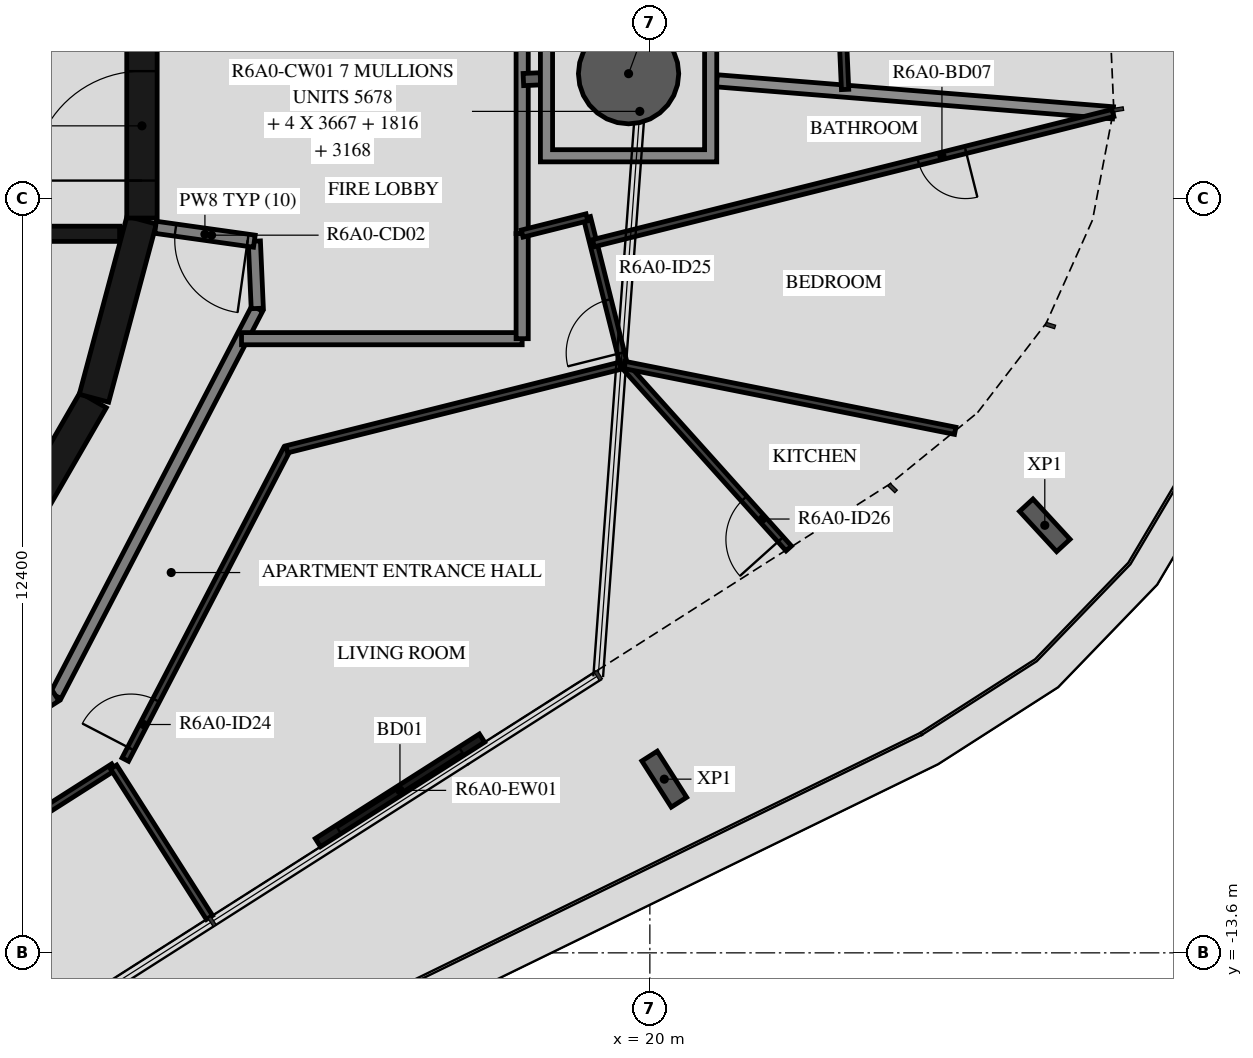
"""IFC4 building model, lengths in metres.
Left out: names, types, materials, properties, quantities, classifications, styles, units other than length and angle.
Written with IfcOpenShell. Run it as: python <this file> out.ifc"""

import sys

from ifc_helpers import new_model, si_unit, direction, frame, frame_2d, origin, origin_2d, place, context, subcontext, project, spatial, polyline, rectangle, hollow_circle, i_section, outline, extrude, element, fill, save


model = new_model("IFC4")
c1 = context("Model", 3, precision=1e-05, world=origin(), true_north=direction((0.0, 1.0)))
c2 = subcontext(c1, "Body", "Model", "MODEL_VIEW")
j1 = project(units=[si_unit("LENGTHUNIT", "METRE"), si_unit("PLANEANGLEUNIT", "RADIAN")], contexts=[c1])
p1 = place(None, origin())
s1 = spatial("IfcSite", under=j1, at=p1, CompositionType="ELEMENT")
p2 = place(p1, origin())
s2 = spatial("IfcBuilding", under=s1, at=p2, CompositionType="ELEMENT")
p3 = place(p2, frame((0.0, 0.0, 226.7)))
s3 = spatial("IfcBuildingStorey", under=s2, at=p3, CompositionType="ELEMENT", Elevation=226.7)
p4 = place(p3, frame((19.65, 0.858, -0.45), z_axis=(0.0, 0.0, 1.0), x_axis=(1.0, 0.0, 0.0)))
e1 = element("IfcColumn", 1, at=p4, inside=s3, PredefinedType="COLUMN", context=c2, shape_type="SweptSolid", body=[
    extrude(hollow_circle(Radius=0.825, WallThickness=0.04, at=origin_2d()), origin(), (0.0, 0.0, 1.0), 3.57),
])
for number, where, z_axis, x_axis in (
    (2, (20.237, -10.744, -0.45), (0.0, 0.0, 1.0), (-0.843, -0.537, 0.0)),
    (3, (26.495, -6.569, -0.45), (0.0, 0.0, 1.0), (-0.735, -0.678, 0.0)),
):
    element("IfcColumn", number, at=place(p3, frame(where, z_axis=z_axis, x_axis=x_axis)), inside=s3, PredefinedType="COLUMN", context=c2, shape_type="SweptSolid", body=[
        extrude(i_section(OverallWidth=0.3, OverallDepth=0.9, WebThickness=0.019, FlangeThickness=0.035, FilletRadius=0.03, at=origin_2d()), origin(), (0.0, 0.0, 1.0), 3.57),
    ])
p5 = place(p3, frame((14.541, -11.788, 0.0), z_axis=(0.0, 0.0, 1.0), x_axis=(0.843419508298, 0.53725555653, 0.0)))
e4 = element("IfcWall", 4, at=p5, inside=s3, PredefinedType="STANDARD", context=c2, shape_type="SweptSolid", body=[
    extrude(rectangle(XDim=3.2, YDim=0.16, at=frame_2d((1.6, 0.0))), origin(), (0.0, 0.0, 1.0), 3.12),
])
p6 = place(p5, frame((0.4, 0.0, 0.0)))
e5 = element("IfcOpeningElement", 5, at=p6, cuts=e4, PredefinedType="OPENING", context=c2, shape_type="SweptSolid", body=[
    extrude(rectangle(XDim=2.4, YDim=2.4, at=frame_2d((1.2, 1.2))), frame((0.0, 0.09, 0.0), z_axis=(0.0, -1.0, 0.0), x_axis=(1.0, 0.0, 0.0)), (0.0, 0.0, 1.0), 0.18),
])
for number, where, z_axis, x_axis in (
    (6, (9.329, -7.137, 0.0), (0.0, 0.0, 1.0), (0.5, 0.866, 0.0)),
    (7, (10.858, -4.479, 0.0), (0.0, 0.0, 1.0), (0.259, 0.966, 0.0)),
):
    element("IfcWall", number, at=place(p3, frame(where, z_axis=z_axis, x_axis=x_axis)), inside=s3, PredefinedType="SHEAR", context=c2, shape_type="SweptSolid", body=[
        extrude(rectangle(XDim=3.033, YDim=0.5, at=frame_2d((1.516, 0.0))), origin(), (0.0, 0.0, 1.0), 3.12),
    ])
p7 = place(p3, frame((11.647, -1.516, 0.0), z_axis=(0.0, 0.0, 1.0), x_axis=(0.0, 1.0, 0.0)))
e8 = element("IfcWall", 8, at=p7, inside=s3, PredefinedType="SHEAR", context=c2, shape_type="SweptSolid", body=[
    extrude(rectangle(XDim=3.033, YDim=0.5, at=frame_2d((1.516, 0.0))), origin(), (0.0, 0.0, 1.0), 3.12),
])
p8 = place(p7, frame((0.616, 0.0, 0.0)))
e9 = element("IfcOpeningElement", 9, at=p8, cuts=e8, PredefinedType="OPENING", context=c2, shape_type="SweptSolid", body=[
    extrude(rectangle(XDim=1.8, YDim=2.1, at=frame_2d((0.9, 1.05))), frame((0.0, 0.26, 0.0), z_axis=(0.0, -1.0, 0.0), x_axis=(1.0, 0.0, 0.0)), (0.0, 0.0, 1.0), 0.52),
])
p9 = place(p3, frame((3.35, -1.775, 0.0), z_axis=(0.0, 0.0, 1.0), x_axis=(1.0, 0.0, 0.0)))
e10 = element("IfcWall", 10, at=p9, inside=s3, PredefinedType="SHEAR", context=c2, shape_type="SweptSolid", body=[
    extrude(rectangle(XDim=7.93, YDim=0.25, at=frame_2d((3.965, 0.0))), origin(), (0.0, 0.0, 1.0), 3.12),
])
p10 = place(p9, frame((0.4, 0.0, 0.0)))
e11 = element("IfcOpeningElement", 11, at=p10, cuts=e10, PredefinedType="OPENING", context=c2, shape_type="SweptSolid", body=[
    extrude(rectangle(XDim=1.1, YDim=2.4, at=frame_2d((0.55, 1.2))), frame((0.0, 0.135, 0.0), z_axis=(0.0, -1.0, 0.0), x_axis=(1.0, 0.0, 0.0)), (0.0, 0.0, 1.0), 0.27),
])
p11 = place(p9, frame((2.55, 0.0, 0.0)))
e12 = element("IfcOpeningElement", 12, at=p11, cuts=e10, PredefinedType="OPENING", context=c2, shape_type="SweptSolid", body=[
    extrude(rectangle(XDim=1.1, YDim=2.4, at=frame_2d((0.55, 1.2))), frame((0.0, 0.135, 0.0), z_axis=(0.0, -1.0, 0.0), x_axis=(1.0, 0.0, 0.0)), (0.0, 0.0, 1.0), 0.27),
])
p12 = place(p9, frame((4.7, 0.0, 0.0)))
e13 = element("IfcOpeningElement", 13, at=p12, cuts=e10, PredefinedType="OPENING", context=c2, shape_type="SweptSolid", body=[
    extrude(rectangle(XDim=1.1, YDim=2.4, at=frame_2d((0.55, 1.2))), frame((0.0, 0.135, 0.0), z_axis=(0.0, -1.0, 0.0), x_axis=(1.0, 0.0, 0.0)), (0.0, 0.0, 1.0), 0.27),
])
p13 = place(p3, frame((10.228, -9.372, 0.0), z_axis=(0.0, 0.0, 1.0), x_axis=(0.461759464021, 0.887005184532, 0.0)))
e14 = element("IfcWall", 14, at=p13, inside=s3, PredefinedType="STANDARD", context=c2, shape_type="SweptSolid", body=[
    extrude(rectangle(XDim=7.181, YDim=0.2, at=frame_2d((3.591, 0.0))), origin(), (0.0, 0.0, 1.0), 3.12),
])
p14 = place(p3, frame((13.544, -3.003, 0.0), z_axis=(0.0, 0.0, 1.0), x_axis=(-0.043666917606, 0.999046145234, 0.0)))
e15 = element("IfcWall", 15, at=p14, inside=s3, PredefinedType="STANDARD", context=c2, shape_type="SweptSolid", body=[
    extrude(rectangle(XDim=1.107, YDim=0.2, at=frame_2d((0.553, 0.0))), origin(), (0.0, 0.0, 1.0), 3.12),
])
p15 = place(p3, frame((13.496, -1.897, 0.0), z_axis=(0.0, 0.0, 1.0), x_axis=(-0.99026234641, 0.139213811391, 0.0)))
e16 = element("IfcWall", 16, at=p15, inside=s3, PredefinedType="STANDARD", context=c2, shape_type="SweptSolid", body=[
    extrude(rectangle(XDim=1.641, YDim=0.2, at=frame_2d((0.821, 0.0))), origin(), (0.0, 0.0, 1.0), 3.12),
])
p16 = place(p15, frame((0.11, 0.0, 0.0)))
e17 = element("IfcOpeningElement", 17, at=p16, cuts=e16, PredefinedType="OPENING", context=c2, shape_type="SweptSolid", body=[
    extrude(rectangle(XDim=1.2, YDim=2.1, at=frame_2d((0.6, 1.05))), frame((0.0, 0.11, 0.0), z_axis=(0.0, -1.0, 0.0), x_axis=(1.0, 0.0, 0.0)), (0.0, 0.0, 1.0), 0.22),
])
p17 = place(p3, frame((4.172, -13.231, 0.0), z_axis=(0.0, 0.0, 1.0), x_axis=(0.843388394728, 0.537304397561, 0.0)))
e18 = element("IfcWall", 18, at=p17, inside=s3, PredefinedType="STANDARD", context=c2, shape_type="SweptSolid", body=[
    extrude(rectangle(XDim=7.181, YDim=0.2, at=frame_2d((3.59, 0.0))), origin(), (0.0, 0.0, 1.0), 3.12),
])
p18 = place(p17, frame((0.2, 0.0, 0.0)))
e19 = element("IfcOpeningElement", 19, at=p18, cuts=e18, PredefinedType="OPENING", context=c2, shape_type="SweptSolid", body=[
    extrude(rectangle(XDim=1.0, YDim=2.1, at=frame_2d((0.5, 1.05))), frame((0.0, 0.11, 0.0), z_axis=(0.0, -1.0, 0.0), x_axis=(1.0, 0.0, 0.0)), (0.0, 0.0, 1.0), 0.22),
])
p19 = place(p3, frame((17.9, -1.772, 0.0), z_axis=(0.0, 0.0, 1.0), x_axis=(0.0, 1.0, 0.0)))
e20 = element("IfcWall", 20, at=p19, inside=s3, PredefinedType="STANDARD", context=c2, shape_type="SweptSolid", body=[
    extrude(rectangle(XDim=5.272, YDim=0.2, at=frame_2d((2.636, 0.0))), origin(), (0.0, 0.0, 1.0), 3.12),
])
p20 = place(p3, frame((13.285, -3.5, 0.0), z_axis=(0.0, 0.0, 1.0), x_axis=(1.0, 0.0, 0.0)))
e21 = element("IfcWall", 21, at=p20, inside=s3, PredefinedType="STANDARD", context=c2, shape_type="SweptSolid", body=[
    extrude(rectangle(XDim=4.615, YDim=0.2, at=frame_2d((2.308, 0.0))), origin(), (0.0, 0.0, 1.0), 3.12),
])
p21 = place(p3, frame((17.9, -3.5, 0.0), z_axis=(0.0, 0.0, 1.0), x_axis=(0.0, 1.0, 0.0)))
e22 = element("IfcWall", 22, at=p21, inside=s3, PredefinedType="STANDARD", context=c2, shape_type="SweptSolid", body=[
    extrude(rectangle(XDim=1.728, YDim=0.2, at=frame_2d((0.864, 0.0))), origin(), (0.0, 0.0, 1.0), 3.12),
])
p22 = place(p3, frame((17.92, 0.761, 0.0), z_axis=(0.0, 0.0, 1.0), x_axis=(0.999051221661, 0.04355061995, 0.0)))
e23 = element("IfcWall", 23, at=p22, inside=s3, PredefinedType="STANDARD", context=c2, shape_type="SweptSolid", body=[
    extrude(rectangle(XDim=0.28, YDim=0.2, at=frame_2d((0.14, 0.0))), origin(), (0.0, 0.0, 1.0), 3.12),
])
p23 = place(p3, frame((21.1, 0.741, 0.0), z_axis=(0.0, 0.0, 1.0), x_axis=(0.996750718609, -0.080548153006, 0.0)))
e24 = element("IfcWall", 24, at=p23, inside=s3, PredefinedType="STANDARD", context=c2, shape_type="SweptSolid", body=[
    extrude(rectangle(XDim=6.538, YDim=0.2, at=frame_2d((3.269, 0.0))), origin(), (0.0, 0.0, 1.0), 2.73),
])
p24 = place(p3, frame((23.174, 1.427, 0.0), z_axis=(0.0, 0.0, 1.0), x_axis=(0.043884567994, -0.999036608284, 0.0)))
e25 = element("IfcWall", 25, at=p24, inside=s3, PredefinedType="PARTITIONING", context=c2, shape_type="SweptSolid", body=[
    extrude(rectangle(XDim=0.829, YDim=0.12, at=frame_2d((0.415, 0.0))), origin(), (0.0, 0.0, 1.0), 3.12),
])
p25 = place(p3, frame((4.83, -14.59, 0.0), z_axis=(0.0, 0.0, 1.0), x_axis=(0.843393042763, 0.537297101629, 0.0)))
e26 = element("IfcWall", 26, at=p25, inside=s3, PredefinedType="PARTITIONING", context=c2, shape_type="SweptSolid", body=[
    extrude(rectangle(XDim=7.53, YDim=0.12, at=frame_2d((3.765, 0.0))), origin(), (0.0, 0.0, 1.0), 3.12),
])
p26 = place(p25, frame((0.2, 0.0, 0.0)))
e27 = element("IfcOpeningElement", 27, at=p26, cuts=e26, PredefinedType="OPENING", context=c2, shape_type="SweptSolid", body=[
    extrude(rectangle(XDim=0.9, YDim=2.1, at=frame_2d((0.45, 1.05))), frame((0.0, 0.07, 0.0), z_axis=(0.0, -1.0, 0.0), x_axis=(1.0, 0.0, 0.0)), (0.0, 0.0, 1.0), 0.14),
])
p27 = place(p3, frame((11.373, -10.421, 0.0), z_axis=(0.0, 0.0, 1.0), x_axis=(0.461738939635, 0.887015868869, 0.0)))
e28 = element("IfcWall", 28, at=p27, inside=s3, PredefinedType="PARTITIONING", context=c2, shape_type="SweptSolid", body=[
    extrude(rectangle(XDim=5.752, YDim=0.12, at=frame_2d((2.876, 0.0))), origin(), (0.0, 0.0, 1.0), 3.12),
])
p28 = place(p27, frame((0.2, 0.0, 0.0)))
e29 = element("IfcOpeningElement", 29, at=p28, cuts=e28, PredefinedType="OPENING", context=c2, shape_type="SweptSolid", body=[
    extrude(rectangle(XDim=0.9, YDim=2.1, at=frame_2d((0.45, 1.05))), frame((0.0, 0.07, 0.0), z_axis=(0.0, -1.0, 0.0), x_axis=(1.0, 0.0, 0.0)), (0.0, 0.0, 1.0), 0.14),
])
p29 = place(p3, frame((14.029, -5.32, 0.0), z_axis=(0.0, 0.0, 1.0), x_axis=(0.969999099814, 0.243108507378, 0.0)))
e30 = element("IfcWall", 30, at=p29, inside=s3, PredefinedType="PARTITIONING", context=c2, shape_type="SweptSolid", body=[
    extrude(rectangle(XDim=5.715, YDim=0.12, at=frame_2d((2.857, 0.0))), origin(), (0.0, 0.0, 1.0), 3.12),
])
p30 = place(p3, frame((19.573, -3.93, 0.0), z_axis=(0.0, 0.0, 1.0), x_axis=(-0.243155959183, 0.96998720585, 0.0)))
e31 = element("IfcWall", 31, at=p30, inside=s3, PredefinedType="PARTITIONING", context=c2, shape_type="SweptSolid", body=[
    extrude(rectangle(XDim=2.5, YDim=0.12, at=frame_2d((1.25, 0.0))), origin(), (0.0, 0.0, 1.0), 3.12),
])
p31 = place(p30, frame((0.2, 0.0, 0.0)))
e32 = element("IfcOpeningElement", 32, at=p31, cuts=e31, PredefinedType="OPENING", context=c2, shape_type="SweptSolid", body=[
    extrude(rectangle(XDim=0.9, YDim=2.1, at=frame_2d((0.45, 1.05))), frame((0.0, 0.07, 0.0), z_axis=(0.0, -1.0, 0.0), x_axis=(1.0, 0.0, 0.0)), (0.0, 0.0, 1.0), 0.14),
])
p32 = place(p3, frame((18.965, -1.505, 0.0), z_axis=(0.0, 0.0, 1.0), x_axis=(-0.969998406835, -0.243111272339, 0.0)))
e33 = element("IfcWall", 33, at=p32, inside=s3, PredefinedType="PARTITIONING", context=c2, shape_type="SweptSolid", body=[
    extrude(rectangle(XDim=1.098, YDim=0.12, at=frame_2d((0.549, 0.0))), origin(), (0.0, 0.0, 1.0), 3.12),
])
p33 = place(p3, frame((12.758, -13.018, 0.0), z_axis=(0.0, 0.0, 1.0), x_axis=(-0.537338423153, 0.843366716798, 0.0)))
e34 = element("IfcWall", 34, at=p33, inside=s3, PredefinedType="PARTITIONING", context=c2, shape_type="SweptSolid", body=[
    extrude(rectangle(XDim=2.934, YDim=0.12, at=frame_2d((1.467, 0.0))), origin(), (0.0, 0.0, 1.0), 2.73),
])
p34 = place(p3, frame((22.284, -6.949, 0.0), z_axis=(0.0, 0.0, 1.0), x_axis=(-0.668156639948, 0.744020634454, 0.0)))
e35 = element("IfcWall", 35, at=p34, inside=s3, PredefinedType="PARTITIONING", context=c2, shape_type="SweptSolid", body=[
    extrude(rectangle(XDim=4.058, YDim=0.12, at=frame_2d((2.029, 0.0))), origin(), (0.0, 0.0, 1.0), 3.12),
])
p35 = place(p34, frame((0.2, 0.0, 0.0)))
e36 = element("IfcOpeningElement", 36, at=p35, cuts=e35, PredefinedType="OPENING", context=c2, shape_type="SweptSolid", body=[
    extrude(rectangle(XDim=0.9, YDim=2.1, at=frame_2d((0.45, 1.05))), frame((0.0, 0.07, 0.0), z_axis=(0.0, -1.0, 0.0), x_axis=(1.0, 0.0, 0.0)), (0.0, 0.0, 1.0), 0.14),
])
p36 = place(p3, frame((25.021, -5.015, 0.0), z_axis=(0.0, 0.0, 1.0), x_axis=(-0.98075605246, 0.195237203328, 0.0)))
e37 = element("IfcWall", 37, at=p36, inside=s3, PredefinedType="PARTITIONING", context=c2, shape_type="SweptSolid", body=[
    extrude(rectangle(XDim=5.556, YDim=0.12, at=frame_2d((2.778, 0.0))), origin(), (0.0, 0.0, 1.0), 3.12),
])
p37 = place(p3, frame((27.616, 0.212, 0.0), z_axis=(0.0, 0.0, 1.0), x_axis=(-0.969995609005, -0.243122435227, 0.0)))
e38 = element("IfcWall", 38, at=p37, inside=s3, PredefinedType="PARTITIONING", context=c2, shape_type="SweptSolid", body=[
    extrude(rectangle(XDim=8.81, YDim=0.12, at=frame_2d((4.405, 0.0))), origin(), (0.0, 0.0, 1.0), 3.12),
])
p38 = place(p37, frame((2.5, 0.0, 0.0)))
e39 = element("IfcOpeningElement", 39, at=p38, cuts=e38, PredefinedType="OPENING", context=c2, shape_type="SweptSolid", body=[
    extrude(rectangle(XDim=0.8, YDim=2.1, at=frame_2d((0.4, 1.05))), frame((0.0, 0.07, 0.0), z_axis=(0.0, -1.0, 0.0), x_axis=(1.0, 0.0, 0.0)), (0.0, 0.0, 1.0), 0.14),
])
p39 = place(p3, origin())
e40 = element("IfcWall", 40, at=p39, inside=s3, PredefinedType="STANDARD", context=c2, shape_type="SweptSolid", body=[
    extrude(outline(polyline([(21.1, 2.308), (21.1, -0.592), (18.2, -0.592), (18.2, 2.308), (21.1, 2.308)]), holes=[polyline([(18.4, -0.392), (20.9, -0.392), (20.9, 2.108), (18.4, 2.108), (18.4, -0.392)])]), origin(), (0.0, 0.0, 1.0), 3.12),
])
p40 = place(p6, origin())
e41 = element("IfcDoor", 41, at=p40, inside=s3, OperationType="DOUBLE_DOOR_SLIDING", PredefinedType="DOOR", context=c2, shape_type="SweptSolid", body=[
    extrude(rectangle(XDim=2.4, YDim=2.4, at=frame_2d((1.2, 1.2))), frame((0.0, 0.025, 0.0), z_axis=(0.0, -1.0, 0.0), x_axis=(1.0, 0.0, 0.0)), (0.0, 0.0, 1.0), 0.05),
])
fill(e5, e41)
p41 = place(p8, origin())
e42 = element("IfcDoor", 42, at=p41, inside=s3, OperationType="DOUBLE_DOOR_SINGLE_SWING", PredefinedType="DOOR", context=c2, shape_type="SweptSolid", body=[
    extrude(rectangle(XDim=1.8, YDim=2.1, at=frame_2d((0.9, 1.05))), frame((0.0, 0.025, 0.0), z_axis=(0.0, -1.0, 0.0), x_axis=(1.0, 0.0, 0.0)), (0.0, 0.0, 1.0), 0.05),
])
fill(e9, e42)
p42 = place(p28, origin())
e43 = element("IfcDoor", 43, at=p42, inside=s3, OperationType="SINGLE_SWING_RIGHT", PredefinedType="DOOR", context=c2, shape_type="SweptSolid", body=[
    extrude(rectangle(XDim=0.9, YDim=2.1, at=frame_2d((0.45, 1.05))), frame((0.0, 0.025, 0.0), z_axis=(0.0, -1.0, 0.0), x_axis=(1.0, 0.0, 0.0)), (0.0, 0.0, 1.0), 0.05),
])
fill(e29, e43)
p43 = place(p31, origin())
e44 = element("IfcDoor", 44, at=p43, inside=s3, OperationType="SINGLE_SWING_RIGHT", PredefinedType="DOOR", context=c2, shape_type="SweptSolid", body=[
    extrude(rectangle(XDim=0.9, YDim=2.1, at=frame_2d((0.45, 1.05))), frame((0.0, 0.025, 0.0), z_axis=(0.0, -1.0, 0.0), x_axis=(1.0, 0.0, 0.0)), (0.0, 0.0, 1.0), 0.05),
])
fill(e32, e44)
p44 = place(p35, origin())
e45 = element("IfcDoor", 45, at=p44, inside=s3, OperationType="SINGLE_SWING_RIGHT", PredefinedType="DOOR", context=c2, shape_type="SweptSolid", body=[
    extrude(rectangle(XDim=0.9, YDim=2.1, at=frame_2d((0.45, 1.05))), frame((0.0, 0.025, 0.0), z_axis=(0.0, -1.0, 0.0), x_axis=(1.0, 0.0, 0.0)), (0.0, 0.0, 1.0), 0.05),
])
fill(e36, e45)
p45 = place(p38, origin())
e46 = element("IfcDoor", 46, at=p45, inside=s3, OperationType="SINGLE_SWING_RIGHT", PredefinedType="DOOR", context=c2, shape_type="SweptSolid", body=[
    extrude(rectangle(XDim=0.8, YDim=2.1, at=frame_2d((0.4, 1.05))), frame((0.0, 0.025, 0.0), z_axis=(0.0, -1.0, 0.0), x_axis=(1.0, 0.0, 0.0)), (0.0, 0.0, 1.0), 0.05),
])
fill(e39, e46)
p46 = place(p16, origin())
e47 = element("IfcDoor", 47, at=p46, inside=s3, OperationType="DOUBLE_DOOR_SINGLE_SWING", PredefinedType="DOOR", context=c2, shape_type="SweptSolid", body=[
    extrude(rectangle(XDim=1.2, YDim=2.1, at=frame_2d((0.6, 1.05))), frame((0.0, 0.025, 0.0), z_axis=(0.0, -1.0, 0.0), x_axis=(1.0, 0.0, 0.0)), (0.0, 0.0, 1.0), 0.05),
])
fill(e17, e47)
save(model, sys.argv[1])
